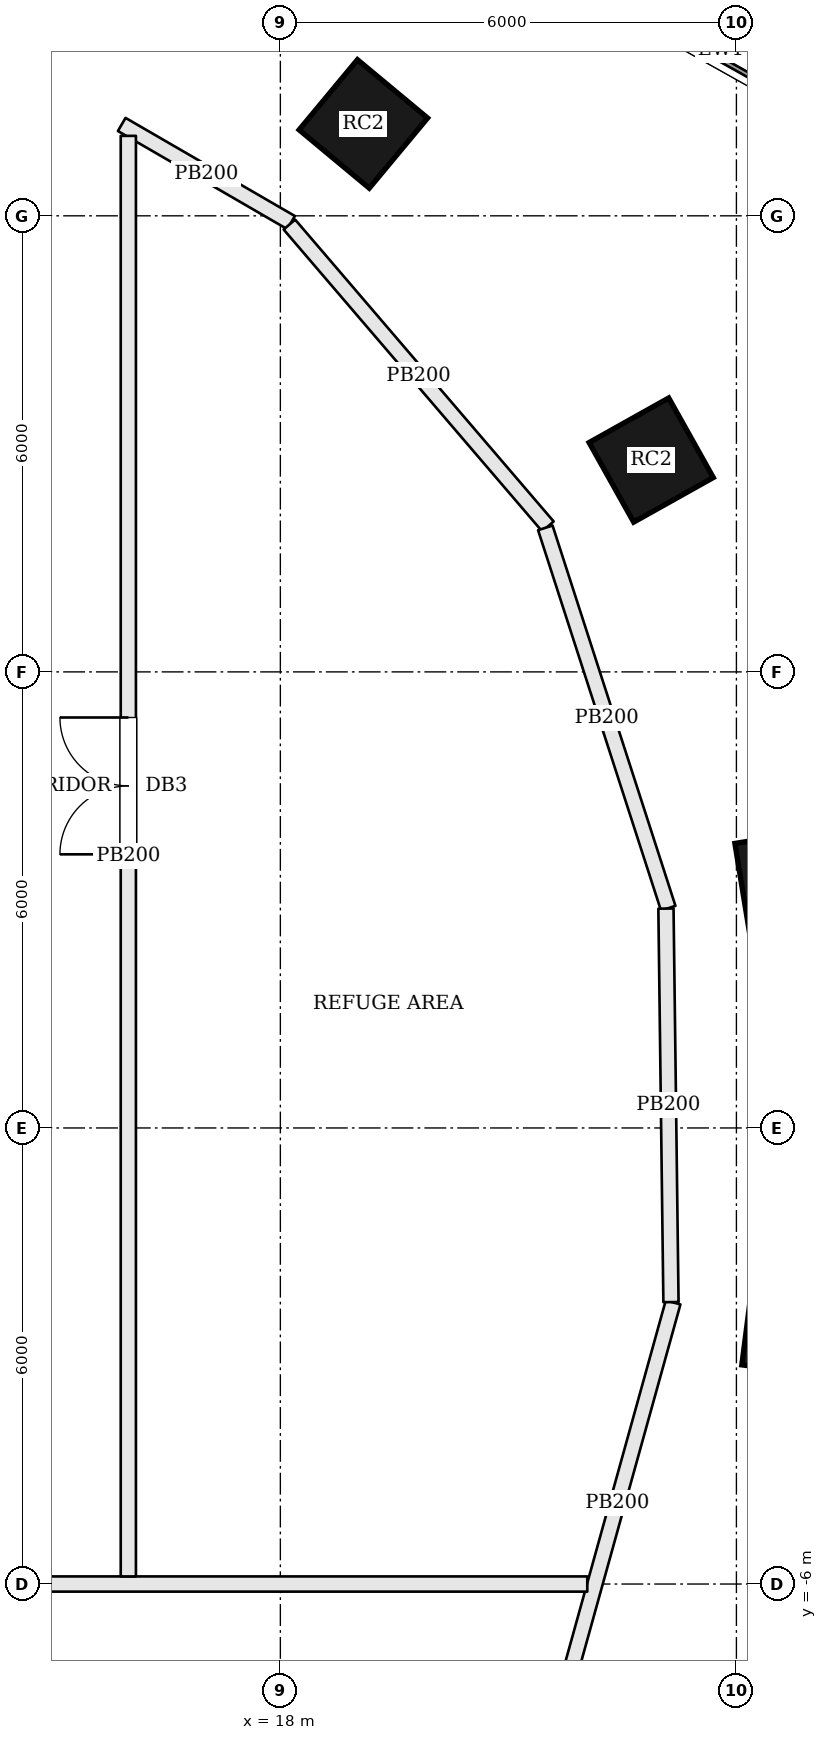
"""IFC4 building model, lengths in metres.
Left out: names, types, materials, properties, quantities, classifications, styles, units other than length and angle.
Written with IfcOpenShell. Run it as: python <this file> out.ifc"""

import sys

from ifc_helpers import new_model, si_unit, direction, frame, frame_2d, origin, origin_2d, place, context, subcontext, project, spatial, rectangle, extrude, element, fill, save


model = new_model("IFC4")
c1 = context("Model", 3, precision=1e-05, world=origin(), true_north=direction((0.0, 1.0)))
c2 = subcontext(c1, "Body", "Model", "MODEL_VIEW")
j1 = project(units=[si_unit("LENGTHUNIT", "METRE"), si_unit("PLANEANGLEUNIT", "RADIAN")], contexts=[c1])
p1 = place(None, origin())
s1 = spatial("IfcSite", under=j1, at=p1, CompositionType="ELEMENT")
p2 = place(p1, origin())
s2 = spatial("IfcBuilding", under=s1, at=p2, CompositionType="ELEMENT")
p3 = place(p2, frame((0.0, 0.0, 106.8)))
s3 = spatial("IfcBuildingStorey", under=s2, at=p3, CompositionType="ELEMENT", Elevation=106.8)
for number, where, z_axis, x_axis in (
    (1, (24.669, 3.248, 0.0), (0.0, 0.0, 1.0), (-0.162, 0.987, 0.0)),
    (2, (22.879, 8.787, 0.0), (0.0, 0.0, 1.0), (-0.489, 0.873, 0.0)),
    (3, (19.092, 13.209, 0.0), (0.0, 0.0, 1.0), (-0.769, 0.639, 0.0)),
    (4, (24.743, -2.599, 0.0), (0.0, 0.0, 1.0), (0.128, 0.992, 0.0)),
):
    element("IfcColumn", number, at=place(p3, frame(where, z_axis=z_axis, x_axis=x_axis)), inside=s3, PredefinedType="COLUMN", context=c2, shape_type="SweptSolid", body=[
        extrude(rectangle(XDim=1.2, YDim=1.2, at=origin_2d()), origin(), (0.0, 0.0, 1.0), 3.6),
    ])
p4 = place(p3, frame((25.844, 13.028, 0.0), z_axis=(0.0, 0.0, 1.0), x_axis=(-0.872346398261, 0.488888291373, 0.0)))
e5 = element("IfcWall", 5, at=p4, inside=s3, PredefinedType="SOLIDWALL", context=c2, shape_type="SweptSolid", body=[
    extrude(rectangle(XDim=4.696, YDim=0.45, at=frame_2d((2.348, 0.0))), origin(), (0.0, 0.0, 1.0), 3.4),
])
p5 = place(p4, frame((1.448, 0.0, 0.9)))
e6 = element("IfcOpeningElement", 6, at=p5, cuts=e5, PredefinedType="OPENING", context=c2, shape_type="SweptSolid", body=[
    extrude(rectangle(XDim=1.8, YDim=2.0, at=frame_2d((0.9, 1.0))), frame((0.0, 0.235, 0.0), z_axis=(0.0, -1.0, 0.0), x_axis=(1.0, 0.0, 0.0)), (0.0, 0.0, 1.0), 0.47),
])
p6 = place(p3, frame((25.734, 13.176, 3.6), z_axis=(0.0, 0.0, 1.0), x_axis=(-0.872345142407, 0.488890532245, 0.0)))
e7 = element("IfcWall", 7, at=p6, inside=s3, PredefinedType="PARAPET", context=c2, shape_type="SweptSolid", body=[
    extrude(rectangle(XDim=4.763, YDim=0.3, at=frame_2d((2.381, 0.0))), origin(), (0.0, 0.0, 1.0), 1.1),
])
p7 = place(p3, frame((23.167, -2.295, 0.0), z_axis=(0.0, 0.0, 1.0), x_axis=(-0.267604764515, -0.963528769684, 0.0)))
e8 = element("IfcWall", 8, at=p7, inside=s3, PredefinedType="PARTITIONING", context=c2, shape_type="SweptSolid", body=[
    extrude(rectangle(XDim=5.475, YDim=0.2, at=frame_2d((2.737, 0.0))), origin(), (0.0, 0.0, 1.0), 3.4),
])
p8 = place(p3, frame((-21.998, -6.0, 0.0), z_axis=(0.0, 0.0, 1.0), x_axis=(1.0, 0.0, 0.0)))
e9 = element("IfcWall", 9, at=p8, inside=s3, PredefinedType="PARTITIONING", context=c2, shape_type="SweptSolid", body=[
    extrude(rectangle(XDim=44.036, YDim=0.2, at=frame_2d((22.018, 0.0))), origin(), (0.0, 0.0, 1.0), 3.4),
])
p9 = place(p8, frame((21.098, 0.0, 0.0)))
e10 = element("IfcOpeningElement", 10, at=p9, cuts=e9, PredefinedType="OPENING", context=c2, shape_type="SweptSolid", body=[
    extrude(rectangle(XDim=1.8, YDim=2.1, at=frame_2d((0.9, 1.05))), frame((0.0, 0.11, 0.0), z_axis=(0.0, -1.0, 0.0), x_axis=(1.0, 0.0, 0.0)), (0.0, 0.0, 1.0), 0.22),
])
p10 = place(p3, frame((15.913, 13.202, 0.0), z_axis=(0.0, 0.0, 1.0), x_axis=(0.86524014554, -0.501357647339, 0.0)))
e11 = element("IfcWall", 11, at=p10, inside=s3, PredefinedType="PARTITIONING", context=c2, shape_type="SweptSolid", body=[
    extrude(rectangle(XDim=2.575, YDim=0.2, at=frame_2d((1.288, 0.0))), origin(), (0.0, 0.0, 1.0), 3.4),
])
p11 = place(p3, frame((18.119, 11.885, 0.0), z_axis=(0.0, 0.0, 1.0), x_axis=(0.650510608515, -0.759497168006, 0.0)))
e12 = element("IfcWall", 12, at=p11, inside=s3, PredefinedType="PARTITIONING", context=c2, shape_type="SweptSolid", body=[
    extrude(rectangle(XDim=5.228, YDim=0.2, at=frame_2d((2.614, 0.0))), origin(), (0.0, 0.0, 1.0), 3.4),
])
p12 = place(p3, frame((21.486, 7.895, 0.0), z_axis=(0.0, 0.0, 1.0), x_axis=(0.307481575482, -0.951554034587, 0.0)))
e13 = element("IfcWall", 13, at=p12, inside=s3, PredefinedType="PARTITIONING", context=c2, shape_type="SweptSolid", body=[
    extrude(rectangle(XDim=5.259, YDim=0.2, at=frame_2d((2.629, 0.0))), origin(), (0.0, 0.0, 1.0), 3.4),
])
p13 = place(p3, frame((23.073, 2.886, 0.0), z_axis=(0.0, 0.0, 1.0), x_axis=(0.012731813994, -0.999918947171, 0.0)))
e14 = element("IfcWall", 14, at=p13, inside=s3, PredefinedType="PARTITIONING", context=c2, shape_type="SweptSolid", body=[
    extrude(rectangle(XDim=5.177, YDim=0.2, at=frame_2d((2.589, 0.0))), origin(), (0.0, 0.0, 1.0), 3.4),
])
p14 = place(p3, frame((16.0, -5.9, 0.0), z_axis=(0.0, 0.0, 1.0), x_axis=(0.0, 1.0, 0.0)))
e15 = element("IfcWall", 15, at=p14, inside=s3, PredefinedType="PARTITIONING", context=c2, shape_type="SweptSolid", body=[
    extrude(rectangle(XDim=18.952, YDim=0.2, at=frame_2d((9.476, 0.0))), origin(), (0.0, 0.0, 1.0), 3.4),
])
p15 = place(p14, frame((9.5, 0.0, 0.0)))
e16 = element("IfcOpeningElement", 16, at=p15, cuts=e15, PredefinedType="OPENING", context=c2, shape_type="SweptSolid", body=[
    extrude(rectangle(XDim=1.8, YDim=2.1, at=frame_2d((0.9, 1.05))), frame((0.0, 0.11, 0.0), z_axis=(0.0, -1.0, 0.0), x_axis=(1.0, 0.0, 0.0)), (0.0, 0.0, 1.0), 0.22),
])
p16 = place(p5, origin())
e17 = element("IfcWindow", 17, at=p16, inside=s3, PartitioningType="SINGLE_PANEL", PredefinedType="WINDOW", context=c2, shape_type="SweptSolid", body=[
    extrude(rectangle(XDim=1.8, YDim=2.0, at=frame_2d((0.9, 1.0))), frame((0.0, 0.135, 0.0), z_axis=(0.0, -1.0, 0.0), x_axis=(1.0, 0.0, 0.0)), (0.0, 0.0, 1.0), 0.06),
])
fill(e6, e17)
p17 = place(p15, origin())
e18 = element("IfcDoor", 18, at=p17, inside=s3, OperationType="DOUBLE_DOOR_SINGLE_SWING", PredefinedType="DOOR", context=c2, shape_type="SweptSolid", body=[
    extrude(rectangle(XDim=1.8, YDim=2.1, at=frame_2d((0.9, 1.05))), frame((0.0, 0.025, 0.0), z_axis=(0.0, -1.0, 0.0), x_axis=(1.0, 0.0, 0.0)), (0.0, 0.0, 1.0), 0.05),
])
fill(e16, e18)
save(model, sys.argv[1])
